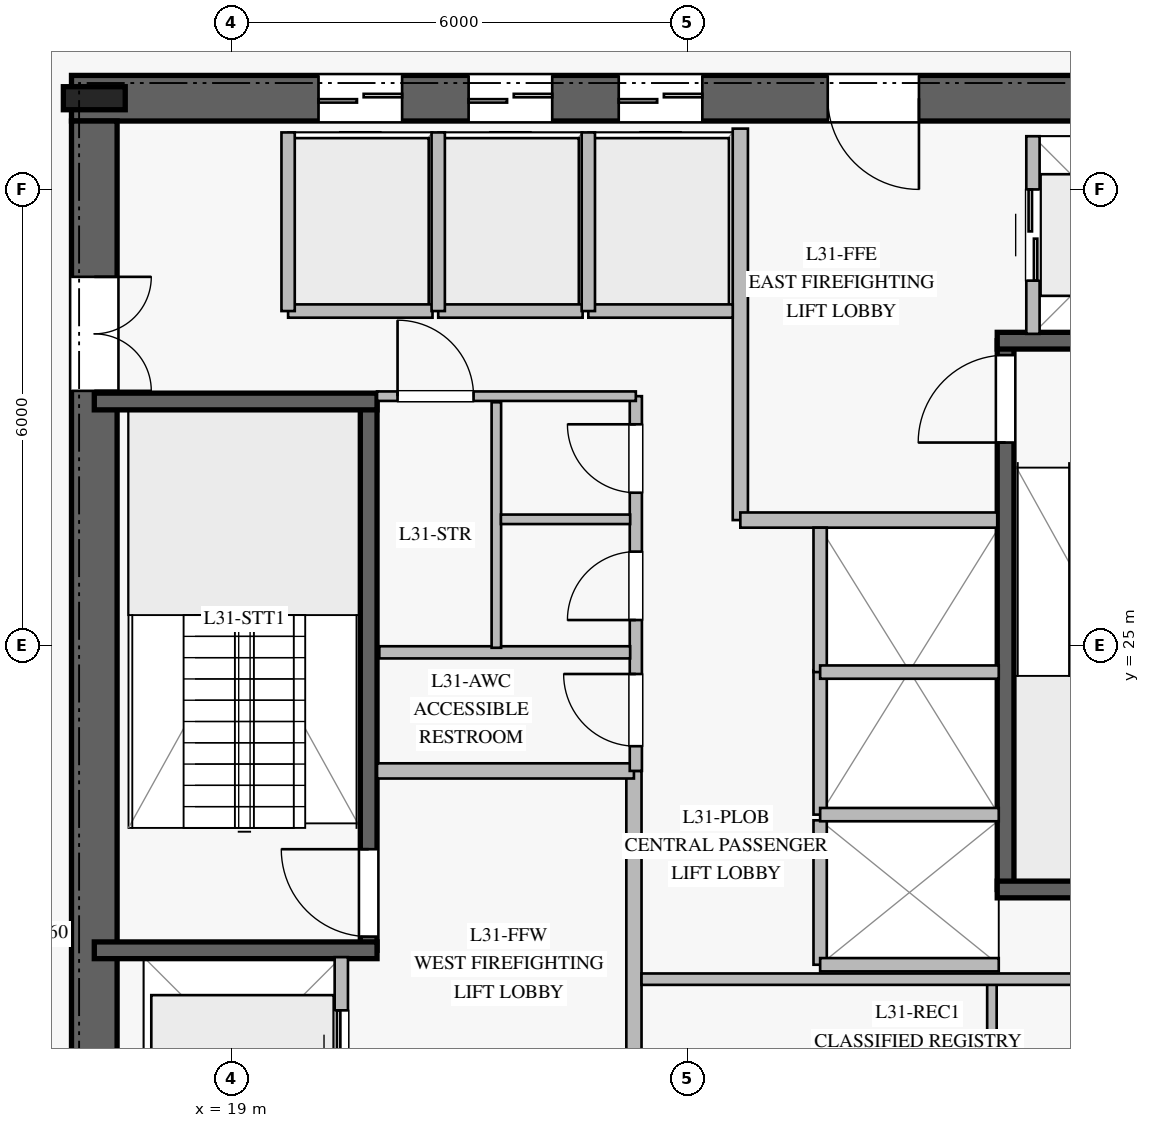
"""IFC4 building model, lengths in metres.
Left out: names, types, materials, properties, quantities, classifications, styles, units other than length and angle.
Written with IfcOpenShell. Run it as: python <this file> out.ifc"""

import sys

from ifc_helpers import new_model, si_unit, direction, frame, frame_2d, origin, origin_2d, place, context, subcontext, project, spatial, rectangle, i_section, extrude, element, fill, save


model = new_model("IFC4")
c1 = context("Model", 3, precision=1e-05, world=origin(), true_north=direction((0.0, 1.0)))
c2 = subcontext(c1, "Body", "Model", "MODEL_VIEW")
j1 = project(units=[si_unit("LENGTHUNIT", "METRE"), si_unit("PLANEANGLEUNIT", "RADIAN")], contexts=[c1])
p1 = place(None, origin())
s1 = spatial("IfcSite", under=j1, at=p1, CompositionType="ELEMENT")
p2 = place(p1, origin())
s2 = spatial("IfcBuilding", under=s1, at=p2, CompositionType="ELEMENT")
p3 = place(p2, frame((0.0, 0.0, 130.4)))
s3 = spatial("IfcBuildingStorey", under=s2, at=p3, CompositionType="ELEMENT", Elevation=130.4)
p4 = place(p3, frame((33.1, 32.2, 0.0), z_axis=(0.0, 0.0, 1.0), x_axis=(-1.0, 0.0, 0.0)))
e1 = element("IfcWall", 1, at=p4, inside=s3, PredefinedType="SHEAR", context=c2, shape_type="SweptSolid", body=[
    extrude(rectangle(XDim=16.2, YDim=0.6, at=frame_2d((8.1, 0.0))), origin(), (0.0, 0.0, 1.0), 3.76),
])
p5 = place(p4, frame((5.05, 0.0, 0.0)))
e2 = element("IfcOpeningElement", 2, at=p5, cuts=e1, PredefinedType="OPENING", context=c2, shape_type="SweptSolid", body=[
    extrude(rectangle(XDim=1.2, YDim=2.25, at=frame_2d((0.6, 1.125))), frame((0.0, 0.31, 0.0), z_axis=(0.0, -1.0, 0.0), x_axis=(1.0, 0.0, 0.0)), (0.0, 0.0, 1.0), 0.62),
])
p6 = place(p4, frame((11.85, 0.0, 0.0)))
e3 = element("IfcOpeningElement", 3, at=p6, cuts=e1, PredefinedType="OPENING", context=c2, shape_type="SweptSolid", body=[
    extrude(rectangle(XDim=1.1, YDim=2.2, at=frame_2d((0.55, 1.1))), frame((0.0, 0.31, 0.0), z_axis=(0.0, -1.0, 0.0), x_axis=(1.0, 0.0, 0.0)), (0.0, 0.0, 1.0), 0.62),
])
p7 = place(p4, frame((9.875, 0.0, 0.0)))
e4 = element("IfcOpeningElement", 4, at=p7, cuts=e1, PredefinedType="OPENING", context=c2, shape_type="SweptSolid", body=[
    extrude(rectangle(XDim=1.1, YDim=2.2, at=frame_2d((0.55, 1.1))), frame((0.0, 0.31, 0.0), z_axis=(0.0, -1.0, 0.0), x_axis=(1.0, 0.0, 0.0)), (0.0, 0.0, 1.0), 0.62),
])
p8 = place(p4, frame((7.9, 0.0, 0.0)))
e5 = element("IfcOpeningElement", 5, at=p8, cuts=e1, PredefinedType="OPENING", context=c2, shape_type="SweptSolid", body=[
    extrude(rectangle(XDim=1.1, YDim=2.2, at=frame_2d((0.55, 1.1))), frame((0.0, 0.31, 0.0), z_axis=(0.0, -1.0, 0.0), x_axis=(1.0, 0.0, 0.0)), (0.0, 0.0, 1.0), 0.62),
])
p9 = place(p3, frame((17.2, 31.9, 0.0), z_axis=(0.0, 0.0, 1.0), x_axis=(0.0, -1.0, 0.0)))
e6 = element("IfcWall", 6, at=p9, inside=s3, PredefinedType="SHEAR", context=c2, shape_type="SweptSolid", body=[
    extrude(rectangle(XDim=13.8, YDim=0.6, at=frame_2d((6.9, 0.0))), origin(), (0.0, 0.0, 1.0), 3.76),
])
p10 = place(p9, frame((2.05, 0.0, 0.0)))
e7 = element("IfcOpeningElement", 7, at=p10, cuts=e6, PredefinedType="OPENING", context=c2, shape_type="SweptSolid", body=[
    extrude(rectangle(XDim=1.5, YDim=2.2, at=frame_2d((0.75, 1.1))), frame((0.0, 0.31, 0.0), z_axis=(0.0, -1.0, 0.0), x_axis=(1.0, 0.0, 0.0)), (0.0, 0.0, 1.0), 0.62),
])
p11 = place(p3, frame((17.2, 32.2, 0.0), z_axis=(0.0, 0.0, 1.0), x_axis=(1.0, 0.0, 0.0)))
e8 = element("IfcColumn", 8, at=p11, inside=s3, PredefinedType="COLUMN", context=c2, shape_type="SweptSolid", body=[
    extrude(i_section(OverallWidth=0.303, OverallDepth=0.814, WebThickness=0.021, FlangeThickness=0.04, at=origin_2d()), origin(), (0.0, 0.0, 1.0), 4.0),
])
p12 = place(p3, frame((20.81, 20.99, 0.0), z_axis=(0.0, 0.0, 1.0), x_axis=(0.0, 1.0, 0.0)))
e9 = element("IfcWall", 9, at=p12, inside=s3, PredefinedType="SOLIDWALL", context=c2, shape_type="SweptSolid", body=[
    extrude(rectangle(XDim=7.22, YDim=0.22, at=frame_2d((3.61, 0.0))), origin(), (0.0, 0.0, 1.0), 3.76),
])
p13 = place(p12, frame((0.18, 0.0, 0.0)))
e10 = element("IfcOpeningElement", 10, at=p13, cuts=e9, PredefinedType="OPENING", context=c2, shape_type="SweptSolid", body=[
    extrude(rectangle(XDim=1.15, YDim=2.2, at=frame_2d((0.575, 1.1))), frame((0.0, 0.12, 0.0), z_axis=(0.0, -1.0, 0.0), x_axis=(1.0, 0.0, 0.0)), (0.0, 0.0, 1.0), 0.24),
])
for number, where, z_axis, x_axis in (
    (11, (17.2, 20.99, 0.0), (0.0, 0.0, 1.0), (1.0, 0.0, 0.0)),
    (12, (17.2, 28.21, 0.0), (0.0, 0.0, 1.0), (1.0, 0.0, 0.0)),
):
    element("IfcWall", number, at=place(p3, frame(where, z_axis=z_axis, x_axis=x_axis)), inside=s3, PredefinedType="SOLIDWALL", context=c2, shape_type="SweptSolid", body=[
        extrude(rectangle(XDim=3.72, YDim=0.22, at=frame_2d((1.86, 0.0))), origin(), (0.0, 0.0, 1.0), 3.76),
    ])
p14 = place(p3, frame((29.19, 21.79, 0.0), z_axis=(0.0, 0.0, 1.0), x_axis=(0.0, 1.0, 0.0)))
e13 = element("IfcWall", 13, at=p14, inside=s3, PredefinedType="SOLIDWALL", context=c2, shape_type="SweptSolid", body=[
    extrude(rectangle(XDim=7.22, YDim=0.22, at=frame_2d((3.61, 0.0))), origin(), (0.0, 0.0, 1.0), 3.76),
])
p15 = place(p14, frame((5.88, 0.0, 0.0)))
e14 = element("IfcOpeningElement", 14, at=p15, cuts=e13, PredefinedType="OPENING", context=c2, shape_type="SweptSolid", body=[
    extrude(rectangle(XDim=1.15, YDim=2.2, at=frame_2d((0.575, 1.1))), frame((0.0, 0.12, 0.0), z_axis=(0.0, -1.0, 0.0), x_axis=(1.0, 0.0, 0.0)), (0.0, 0.0, 1.0), 0.24),
])
for number, where, z_axis, x_axis in (
    (15, (29.08, 21.79, 0.0), (0.0, 0.0, 1.0), (1.0, 0.0, 0.0)),
    (16, (29.08, 29.01, 0.0), (0.0, 0.0, 1.0), (1.0, 0.0, 0.0)),
):
    element("IfcWall", number, at=place(p3, frame(where, z_axis=z_axis, x_axis=x_axis)), inside=s3, PredefinedType="SOLIDWALL", context=c2, shape_type="SweptSolid", body=[
        extrude(rectangle(XDim=3.72, YDim=0.22, at=frame_2d((1.86, 0.0))), origin(), (0.0, 0.0, 1.0), 3.76),
    ])
p16 = place(p3, frame((24.3, 18.2, 0.0), z_axis=(0.0, 0.0, 1.0), x_axis=(0.0, 1.0, 0.0)))
e17 = element("IfcWall", 17, at=p16, inside=s3, PredefinedType="PARTITIONING", context=c2, shape_type="SweptSolid", body=[
    extrude(rectangle(XDim=5.15, YDim=0.2, at=frame_2d((2.575, 0.0))), origin(), (0.0, 0.0, 1.0), 3.76),
])
p17 = place(p3, frame((20.92, 23.35, 0.0), z_axis=(0.0, 0.0, 1.0), x_axis=(1.0, 0.0, 0.0)))
e18 = element("IfcWall", 18, at=p17, inside=s3, PredefinedType="PARTITIONING", context=c2, shape_type="SweptSolid", body=[
    extrude(rectangle(XDim=3.38, YDim=0.2, at=frame_2d((1.69, 0.0))), origin(), (0.0, 0.0, 1.0), 3.76),
])
p18 = place(p3, frame((25.7, 26.65, 0.0), z_axis=(0.0, 0.0, 1.0), x_axis=(0.0, 1.0, 0.0)))
e19 = element("IfcWall", 19, at=p18, inside=s3, PredefinedType="PARTITIONING", context=c2, shape_type="SweptSolid", body=[
    extrude(rectangle(XDim=5.15, YDim=0.2, at=frame_2d((2.575, 0.0))), origin(), (0.0, 0.0, 1.0), 3.76),
])
p19 = place(p3, frame((25.7, 26.65, 0.0), z_axis=(0.0, 0.0, 1.0), x_axis=(1.0, 0.0, 0.0)))
e20 = element("IfcWall", 20, at=p19, inside=s3, PredefinedType="PARTITIONING", context=c2, shape_type="SweptSolid", body=[
    extrude(rectangle(XDim=3.38, YDim=0.2, at=frame_2d((1.69, 0.0))), origin(), (0.0, 0.0, 1.0), 3.76),
])
p20 = place(p3, frame((24.325, 23.35, 0.0), z_axis=(0.0, 0.0, 1.0), x_axis=(0.0, 1.0, 0.0)))
e21 = element("IfcWall", 21, at=p20, inside=s3, PredefinedType="PLUMBINGWALL", context=c2, shape_type="SweptSolid", body=[
    extrude(rectangle(XDim=4.93, YDim=0.16, at=frame_2d((2.465, 0.0))), origin(), (0.0, 0.0, 1.0), 3.76),
])
p21 = place(p20, frame((0.325, 0.0, 0.0)))
e22 = element("IfcOpeningElement", 22, at=p21, cuts=e21, PredefinedType="OPENING", context=c2, shape_type="SweptSolid", body=[
    extrude(rectangle(XDim=0.95, YDim=2.1, at=frame_2d((0.475, 1.05))), frame((0.0, 0.09, 0.0), z_axis=(0.0, -1.0, 0.0), x_axis=(1.0, 0.0, 0.0)), (0.0, 0.0, 1.0), 0.18),
])
p22 = place(p20, frame((1.985, 0.0, 0.0)))
e23 = element("IfcOpeningElement", 23, at=p22, cuts=e21, PredefinedType="OPENING", context=c2, shape_type="SweptSolid", body=[
    extrude(rectangle(XDim=0.9, YDim=2.1, at=frame_2d((0.45, 1.05))), frame((0.0, 0.09, 0.0), z_axis=(0.0, -1.0, 0.0), x_axis=(1.0, 0.0, 0.0)), (0.0, 0.0, 1.0), 0.18),
])
p23 = place(p20, frame((3.66, 0.0, 0.0)))
e24 = element("IfcOpeningElement", 24, at=p23, cuts=e21, PredefinedType="OPENING", context=c2, shape_type="SweptSolid", body=[
    extrude(rectangle(XDim=0.9, YDim=2.1, at=frame_2d((0.45, 1.05))), frame((0.0, 0.09, 0.0), z_axis=(0.0, -1.0, 0.0), x_axis=(1.0, 0.0, 0.0)), (0.0, 0.0, 1.0), 0.18),
])
p24 = place(p3, frame((20.92, 28.28, 0.0), z_axis=(0.0, 0.0, 1.0), x_axis=(1.0, 0.0, 0.0)))
e25 = element("IfcWall", 25, at=p24, inside=s3, PredefinedType="PARTITIONING", context=c2, shape_type="SweptSolid", body=[
    extrude(rectangle(XDim=3.405, YDim=0.125, at=frame_2d((1.703, 0.0))), origin(), (0.0, 0.0, 1.0), 3.76),
])
p25 = place(p24, frame((0.27, 0.0, 0.0)))
e26 = element("IfcOpeningElement", 26, at=p25, cuts=e25, PredefinedType="OPENING", context=c2, shape_type="SweptSolid", body=[
    extrude(rectangle(XDim=1.0, YDim=2.15, at=frame_2d((0.5, 1.075))), frame((0.0, 0.073, 0.0), z_axis=(0.0, -1.0, 0.0), x_axis=(1.0, 0.0, 0.0)), (0.0, 0.0, 1.0), 0.145),
])
p26 = place(p3, frame((29.01, 18.1, 0.0), z_axis=(0.0, 0.0, 1.0), x_axis=(0.0, 1.0, 0.0)))
e27 = element("IfcWall", 27, at=p26, inside=s3, PredefinedType="PARTITIONING", context=c2, shape_type="SweptSolid", body=[
    extrude(rectangle(XDim=2.45, YDim=0.125, at=frame_2d((1.225, 0.0))), origin(), (0.0, 0.0, 1.0), 3.76),
])
p27 = place(p3, frame((20.95, 24.91, 0.0), z_axis=(0.0, 0.0, 1.0), x_axis=(1.0, 0.0, 0.0)))
e28 = element("IfcWall", 28, at=p27, inside=s3, PredefinedType="PLUMBINGWALL", context=c2, shape_type="SweptSolid", body=[
    extrude(rectangle(XDim=3.3, YDim=0.16, at=frame_2d((1.65, 0.0))), origin(), (0.0, 0.0, 1.0), 3.76),
])
p28 = place(p3, frame((22.49, 24.97, 0.0), z_axis=(0.0, 0.0, 1.0), x_axis=(0.0, 1.0, 0.0)))
e29 = element("IfcWall", 29, at=p28, inside=s3, PredefinedType="PARTITIONING", context=c2, shape_type="SweptSolid", body=[
    extrude(rectangle(XDim=3.23, YDim=0.125, at=frame_2d((1.615, 0.0))), origin(), (0.0, 0.0, 1.0), 3.76),
])
p29 = place(p3, frame((22.55, 26.66, 0.0), z_axis=(0.0, 0.0, 1.0), x_axis=(1.0, 0.0, 0.0)))
e30 = element("IfcWall", 30, at=p29, inside=s3, PredefinedType="PARTITIONING", context=c2, shape_type="SweptSolid", body=[
    extrude(rectangle(XDim=1.7, YDim=0.125, at=frame_2d((0.85, 0.0))), origin(), (0.0, 0.0, 1.0), 3.76),
])
p30 = place(p3, frame((24.4, 20.61, 0.0), z_axis=(0.0, 0.0, 1.0), x_axis=(1.0, 0.0, 0.0)))
e31 = element("IfcWall", 31, at=p30, inside=s3, PredefinedType="PARTITIONING", context=c2, shape_type="SweptSolid", body=[
    extrude(rectangle(XDim=5.9, YDim=0.15, at=frame_2d((2.95, 0.0))), origin(), (0.0, 0.0, 1.0), 3.76),
])
p31 = place(p3, frame((19.75, 29.4, 0.0), z_axis=(0.0, 0.0, 1.0), x_axis=(1.0, 0.0, 0.0)))
e32 = element("IfcWall", 32, at=p31, inside=s3, PredefinedType="PARTITIONING", context=c2, shape_type="SweptSolid", body=[
    extrude(rectangle(XDim=1.9, YDim=0.175, at=frame_2d((0.95, 0.0))), origin(), (0.0, 0.0, 1.0), 3.76),
])
p32 = place(p3, frame((19.75, 29.4, 0.0), z_axis=(0.0, 0.0, 1.0), x_axis=(0.0, 1.0, 0.0)))
e33 = element("IfcWall", 33, at=p32, inside=s3, PredefinedType="PARTITIONING", context=c2, shape_type="SweptSolid", body=[
    extrude(rectangle(XDim=2.35, YDim=0.175, at=frame_2d((1.175, 0.0))), origin(), (0.0, 0.0, 1.0), 3.76),
])
p33 = place(p3, frame((21.725, 29.4, 0.0), z_axis=(0.0, 0.0, 1.0), x_axis=(1.0, 0.0, 0.0)))
e34 = element("IfcWall", 34, at=p33, inside=s3, PredefinedType="PARTITIONING", context=c2, shape_type="SweptSolid", body=[
    extrude(rectangle(XDim=1.9, YDim=0.175, at=frame_2d((0.95, 0.0))), origin(), (0.0, 0.0, 1.0), 3.76),
])
p34 = place(p3, frame((21.725, 29.4, 0.0), z_axis=(0.0, 0.0, 1.0), x_axis=(0.0, 1.0, 0.0)))
e35 = element("IfcWall", 35, at=p34, inside=s3, PredefinedType="PARTITIONING", context=c2, shape_type="SweptSolid", body=[
    extrude(rectangle(XDim=2.35, YDim=0.175, at=frame_2d((1.175, 0.0))), origin(), (0.0, 0.0, 1.0), 3.76),
])
p35 = place(p3, frame((23.7, 29.4, 0.0), z_axis=(0.0, 0.0, 1.0), x_axis=(1.0, 0.0, 0.0)))
e36 = element("IfcWall", 36, at=p35, inside=s3, PredefinedType="PARTITIONING", context=c2, shape_type="SweptSolid", body=[
    extrude(rectangle(XDim=1.9, YDim=0.175, at=frame_2d((0.95, 0.0))), origin(), (0.0, 0.0, 1.0), 3.76),
])
p36 = place(p3, frame((23.7, 29.4, 0.0), z_axis=(0.0, 0.0, 1.0), x_axis=(0.0, 1.0, 0.0)))
e37 = element("IfcWall", 37, at=p36, inside=s3, PredefinedType="PARTITIONING", context=c2, shape_type="SweptSolid", body=[
    extrude(rectangle(XDim=2.35, YDim=0.175, at=frame_2d((1.175, 0.0))), origin(), (0.0, 0.0, 1.0), 3.76),
])
p37 = place(p3, frame((26.75, 20.8, 0.0), z_axis=(0.0, 0.0, 1.0), x_axis=(0.0, 1.0, 0.0)))
e38 = element("IfcWall", 38, at=p37, inside=s3, PredefinedType="PARTITIONING", context=c2, shape_type="SweptSolid", body=[
    extrude(rectangle(XDim=1.9, YDim=0.175, at=frame_2d((0.95, 0.0))), origin(), (0.0, 0.0, 1.0), 3.76),
])
p38 = place(p3, frame((26.75, 20.8, 0.0), z_axis=(0.0, 0.0, 1.0), x_axis=(1.0, 0.0, 0.0)))
e39 = element("IfcWall", 39, at=p38, inside=s3, PredefinedType="PARTITIONING", context=c2, shape_type="SweptSolid", body=[
    extrude(rectangle(XDim=2.35, YDim=0.175, at=frame_2d((1.175, 0.0))), origin(), (0.0, 0.0, 1.0), 3.76),
])
p39 = place(p3, frame((26.75, 22.775, 0.0), z_axis=(0.0, 0.0, 1.0), x_axis=(0.0, 1.0, 0.0)))
e40 = element("IfcWall", 40, at=p39, inside=s3, PredefinedType="PARTITIONING", context=c2, shape_type="SweptSolid", body=[
    extrude(rectangle(XDim=1.9, YDim=0.175, at=frame_2d((0.95, 0.0))), origin(), (0.0, 0.0, 1.0), 3.76),
])
p40 = place(p3, frame((26.75, 22.775, 0.0), z_axis=(0.0, 0.0, 1.0), x_axis=(1.0, 0.0, 0.0)))
e41 = element("IfcWall", 41, at=p40, inside=s3, PredefinedType="PARTITIONING", context=c2, shape_type="SweptSolid", body=[
    extrude(rectangle(XDim=2.35, YDim=0.175, at=frame_2d((1.175, 0.0))), origin(), (0.0, 0.0, 1.0), 3.76),
])
p41 = place(p3, frame((26.75, 24.65, 0.0), z_axis=(0.0, 0.0, 1.0), x_axis=(0.0, 1.0, 0.0)))
e42 = element("IfcWall", 42, at=p41, inside=s3, PredefinedType="PARTITIONING", context=c2, shape_type="SweptSolid", body=[
    extrude(rectangle(XDim=1.9, YDim=0.175, at=frame_2d((0.95, 0.0))), origin(), (0.0, 0.0, 1.0), 3.76),
])
p42 = place(p3, frame((26.75, 24.65, 0.0), z_axis=(0.0, 0.0, 1.0), x_axis=(1.0, 0.0, 0.0)))
e43 = element("IfcWall", 43, at=p42, inside=s3, PredefinedType="PARTITIONING", context=c2, shape_type="SweptSolid", body=[
    extrude(rectangle(XDim=2.35, YDim=0.175, at=frame_2d((1.175, 0.0))), origin(), (0.0, 0.0, 1.0), 3.76),
])
p43 = place(p3, frame((20.45, 18.3, 0.0), z_axis=(0.0, 0.0, 1.0), x_axis=(0.0, 1.0, 0.0)))
e44 = element("IfcWall", 44, at=p43, inside=s3, PredefinedType="PARTITIONING", context=c2, shape_type="SweptSolid", body=[
    extrude(rectangle(XDim=2.6, YDim=0.175, at=frame_2d((1.3, 0.0))), origin(), (0.0, 0.0, 1.0), 3.76),
])
p44 = place(p43, frame((0.7, 0.0, 0.0)))
e45 = element("IfcOpeningElement", 45, at=p44, cuts=e44, PredefinedType="OPENING", context=c2, shape_type="SweptSolid", body=[
    extrude(rectangle(XDim=1.2, YDim=2.2, at=frame_2d((0.6, 1.1))), frame((0.0, 0.098, 0.0), z_axis=(0.0, -1.0, 0.0), x_axis=(1.0, 0.0, 0.0)), (0.0, 0.0, 1.0), 0.195),
])
p45 = place(p3, frame((29.55, 29.1, 0.0), z_axis=(0.0, 0.0, 1.0), x_axis=(0.0, 1.0, 0.0)))
e46 = element("IfcWall", 46, at=p45, inside=s3, PredefinedType="PARTITIONING", context=c2, shape_type="SweptSolid", body=[
    extrude(rectangle(XDim=2.6, YDim=0.175, at=frame_2d((1.3, 0.0))), origin(), (0.0, 0.0, 1.0), 3.76),
])
p46 = place(p45, frame((0.7, 0.0, 0.0)))
e47 = element("IfcOpeningElement", 47, at=p46, cuts=e46, PredefinedType="OPENING", context=c2, shape_type="SweptSolid", body=[
    extrude(rectangle(XDim=1.2, YDim=2.2, at=frame_2d((0.6, 1.1))), frame((0.0, 0.098, 0.0), z_axis=(0.0, -1.0, 0.0), x_axis=(1.0, 0.0, 0.0)), (0.0, 0.0, 1.0), 0.195),
])
p47 = place(p13, origin())
e48 = element("IfcDoor", 48, at=p47, inside=s3, OperationType="SINGLE_SWING_RIGHT", PredefinedType="DOOR", context=c2, shape_type="SweptSolid", body=[
    extrude(rectangle(XDim=1.15, YDim=2.2, at=frame_2d((0.575, 1.1))), frame((0.0, 0.025, 0.0), z_axis=(0.0, -1.0, 0.0), x_axis=(1.0, 0.0, 0.0)), (0.0, 0.0, 1.0), 0.05),
])
fill(e10, e48)
p48 = place(p15, origin())
e49 = element("IfcDoor", 49, at=p48, inside=s3, OperationType="SINGLE_SWING_LEFT", PredefinedType="DOOR", context=c2, shape_type="SweptSolid", body=[
    extrude(rectangle(XDim=1.15, YDim=2.2, at=frame_2d((0.575, 1.1))), frame((0.0, 0.025, 0.0), z_axis=(0.0, -1.0, 0.0), x_axis=(1.0, 0.0, 0.0)), (0.0, 0.0, 1.0), 0.05),
])
fill(e14, e49)
p49 = place(p5, origin())
e50 = element("IfcDoor", 50, at=p49, inside=s3, OperationType="SINGLE_SWING_LEFT", PredefinedType="DOOR", context=c2, shape_type="SweptSolid", body=[
    extrude(rectangle(XDim=1.2, YDim=2.25, at=frame_2d((0.6, 1.125))), frame((0.0, 0.025, 0.0), z_axis=(0.0, -1.0, 0.0), x_axis=(1.0, 0.0, 0.0)), (0.0, 0.0, 1.0), 0.05),
])
fill(e2, e50)
p50 = place(p10, origin())
e51 = element("IfcDoor", 51, at=p50, inside=s3, OperationType="DOUBLE_DOOR_SINGLE_SWING", PredefinedType="DOOR", context=c2, shape_type="SweptSolid", body=[
    extrude(rectangle(XDim=1.5, YDim=2.2, at=frame_2d((0.75, 1.1))), frame((0.0, 0.025, 0.0), z_axis=(0.0, -1.0, 0.0), x_axis=(1.0, 0.0, 0.0)), (0.0, 0.0, 1.0), 0.05),
])
fill(e7, e51)
p51 = place(p21, origin())
e52 = element("IfcDoor", 52, at=p51, inside=s3, OperationType="SINGLE_SWING_RIGHT", PredefinedType="DOOR", context=c2, shape_type="SweptSolid", body=[
    extrude(rectangle(XDim=0.95, YDim=2.1, at=frame_2d((0.475, 1.05))), frame((0.0, 0.025, 0.0), z_axis=(0.0, -1.0, 0.0), x_axis=(1.0, 0.0, 0.0)), (0.0, 0.0, 1.0), 0.05),
])
fill(e22, e52)
p52 = place(p22, origin())
e53 = element("IfcDoor", 53, at=p52, inside=s3, OperationType="SINGLE_SWING_LEFT", PredefinedType="DOOR", context=c2, shape_type="SweptSolid", body=[
    extrude(rectangle(XDim=0.9, YDim=2.1, at=frame_2d((0.45, 1.05))), frame((0.0, 0.025, 0.0), z_axis=(0.0, -1.0, 0.0), x_axis=(1.0, 0.0, 0.0)), (0.0, 0.0, 1.0), 0.05),
])
fill(e23, e53)
p53 = place(p23, origin())
e54 = element("IfcDoor", 54, at=p53, inside=s3, OperationType="SINGLE_SWING_RIGHT", PredefinedType="DOOR", context=c2, shape_type="SweptSolid", body=[
    extrude(rectangle(XDim=0.9, YDim=2.1, at=frame_2d((0.45, 1.05))), frame((0.0, 0.025, 0.0), z_axis=(0.0, -1.0, 0.0), x_axis=(1.0, 0.0, 0.0)), (0.0, 0.0, 1.0), 0.05),
])
fill(e24, e54)
p54 = place(p25, origin())
e55 = element("IfcDoor", 55, at=p54, inside=s3, OperationType="SINGLE_SWING_LEFT", PredefinedType="DOOR", context=c2, shape_type="SweptSolid", body=[
    extrude(rectangle(XDim=1.0, YDim=2.15, at=frame_2d((0.5, 1.075))), frame((0.0, 0.025, 0.0), z_axis=(0.0, -1.0, 0.0), x_axis=(1.0, 0.0, 0.0)), (0.0, 0.0, 1.0), 0.05),
])
fill(e26, e55)
p55 = place(p6, origin())
e56 = element("IfcDoor", 56, at=p55, inside=s3, OperationType="DOUBLE_DOOR_SLIDING", PredefinedType="DOOR", context=c2, shape_type="SweptSolid", body=[
    extrude(rectangle(XDim=1.1, YDim=2.2, at=frame_2d((0.55, 1.1))), frame((0.0, 0.025, 0.0), z_axis=(0.0, -1.0, 0.0), x_axis=(1.0, 0.0, 0.0)), (0.0, 0.0, 1.0), 0.05),
])
fill(e3, e56)
p56 = place(p7, origin())
e57 = element("IfcDoor", 57, at=p56, inside=s3, OperationType="DOUBLE_DOOR_SLIDING", PredefinedType="DOOR", context=c2, shape_type="SweptSolid", body=[
    extrude(rectangle(XDim=1.1, YDim=2.2, at=frame_2d((0.55, 1.1))), frame((0.0, 0.025, 0.0), z_axis=(0.0, -1.0, 0.0), x_axis=(1.0, 0.0, 0.0)), (0.0, 0.0, 1.0), 0.05),
])
fill(e4, e57)
p57 = place(p8, origin())
e58 = element("IfcDoor", 58, at=p57, inside=s3, OperationType="DOUBLE_DOOR_SLIDING", PredefinedType="DOOR", context=c2, shape_type="SweptSolid", body=[
    extrude(rectangle(XDim=1.1, YDim=2.2, at=frame_2d((0.55, 1.1))), frame((0.0, 0.025, 0.0), z_axis=(0.0, -1.0, 0.0), x_axis=(1.0, 0.0, 0.0)), (0.0, 0.0, 1.0), 0.05),
])
fill(e5, e58)
p58 = place(p44, origin())
e59 = element("IfcDoor", 59, at=p58, inside=s3, OperationType="DOUBLE_DOOR_SLIDING", PredefinedType="DOOR", context=c2, shape_type="SweptSolid", body=[
    extrude(rectangle(XDim=1.2, YDim=2.2, at=frame_2d((0.6, 1.1))), frame((0.0, 0.025, 0.0), z_axis=(0.0, -1.0, 0.0), x_axis=(1.0, 0.0, 0.0)), (0.0, 0.0, 1.0), 0.05),
])
fill(e45, e59)
p59 = place(p46, origin())
e60 = element("IfcDoor", 60, at=p59, inside=s3, OperationType="DOUBLE_DOOR_SLIDING", PredefinedType="DOOR", context=c2, shape_type="SweptSolid", body=[
    extrude(rectangle(XDim=1.2, YDim=2.2, at=frame_2d((0.6, 1.1))), frame((0.0, 0.025, 0.0), z_axis=(0.0, -1.0, 0.0), x_axis=(1.0, 0.0, 0.0)), (0.0, 0.0, 1.0), 0.05),
])
fill(e47, e60)
save(model, sys.argv[1])
